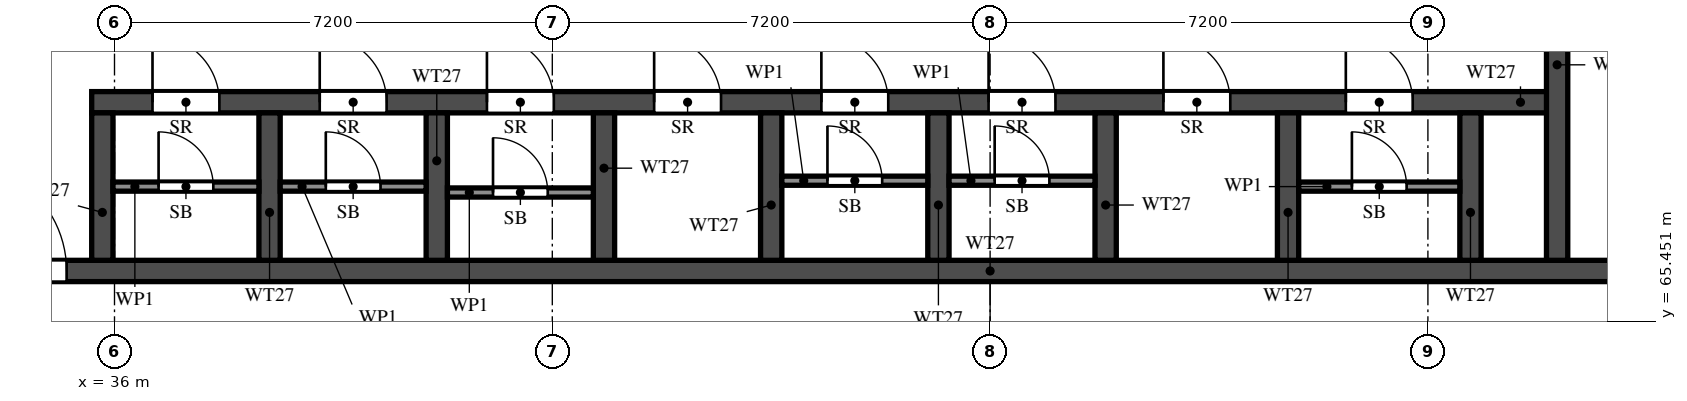
"""IFC4 building model, lengths in metres.
Left out: names, types, materials, properties, quantities, classifications, styles, units other than length and angle.
Written with IfcOpenShell. Run it as: python <this file> out.ifc"""

import sys

from ifc_helpers import new_model, si_unit, direction, frame, frame_2d, origin, place, context, subcontext, project, spatial, rectangle, extrude, element, fill, save


model = new_model("IFC4")
c1 = context("Model", 3, precision=1e-05, world=origin(), true_north=direction((0.0, 1.0)))
c2 = subcontext(c1, "Body", "Model", "MODEL_VIEW")
j1 = project(units=[si_unit("LENGTHUNIT", "METRE"), si_unit("PLANEANGLEUNIT", "RADIAN")], contexts=[c1])
p1 = place(None, origin())
s1 = spatial("IfcSite", under=j1, at=p1, CompositionType="ELEMENT")
p2 = place(p1, origin())
s2 = spatial("IfcBuilding", under=s1, at=p2, CompositionType="ELEMENT")
p3 = place(p2, frame((0.0, 0.0, 199.0)))
s3 = spatial("IfcBuildingStorey", under=s2, at=p3, CompositionType="ELEMENT", Elevation=199.0)
p4 = place(p3, frame((29.7, 66.275, 0.0), z_axis=(0.0, 0.0, 1.0), x_axis=(1.0, 0.0, 0.0)))
e1 = element("IfcWall", 1, at=p4, inside=s3, PredefinedType="SHEAR", context=c2, shape_type="SweptSolid", body=[
    extrude(rectangle(XDim=41.4, YDim=0.35, at=frame_2d((20.7, 0.0))), origin(), (0.0, 0.0, 1.0), 3.2),
])
p5 = place(p4, frame((0.925, 0.0, 0.0)))
e2 = element("IfcOpeningElement", 2, at=p5, cuts=e1, PredefinedType="OPENING", context=c2, shape_type="SweptSolid", body=[
    extrude(rectangle(XDim=1.1, YDim=2.1, at=frame_2d((0.55, 1.05))), frame((0.0, 0.185, 0.0), z_axis=(0.0, -1.0, 0.0), x_axis=(1.0, 0.0, 0.0)), (0.0, 0.0, 1.0), 0.37),
])
p6 = place(p4, frame((3.712, 0.0, 0.0)))
e3 = element("IfcOpeningElement", 3, at=p6, cuts=e1, PredefinedType="OPENING", context=c2, shape_type="SweptSolid", body=[
    extrude(rectangle(XDim=1.8, YDim=2.1, at=frame_2d((0.9, 1.05))), frame((0.0, 0.185, 0.0), z_axis=(0.0, -1.0, 0.0), x_axis=(1.0, 0.0, 0.0)), (0.0, 0.0, 1.0), 0.37),
])
p7 = place(p3, frame((35.625, 69.05, 0.0), z_axis=(0.0, 0.0, 1.0), x_axis=(1.0, 0.0, 0.0)))
e4 = element("IfcWall", 4, at=p7, inside=s3, PredefinedType="SHEAR", context=c2, shape_type="SweptSolid", body=[
    extrude(rectangle(XDim=24.1, YDim=0.35, at=frame_2d((12.05, 0.0))), origin(), (0.0, 0.0, 1.0), 3.2),
])
p8 = place(p7, frame((1.0, 0.0, 0.0)))
e5 = element("IfcOpeningElement", 5, at=p8, cuts=e4, PredefinedType="OPENING", context=c2, shape_type="SweptSolid", body=[
    extrude(rectangle(XDim=1.1, YDim=2.1, at=frame_2d((0.55, 1.05))), frame((0.0, 0.185, 0.0), z_axis=(0.0, -1.0, 0.0), x_axis=(1.0, 0.0, 0.0)), (0.0, 0.0, 1.0), 0.37),
])
p9 = place(p7, frame((3.75, 0.0, 0.0)))
e6 = element("IfcOpeningElement", 6, at=p9, cuts=e4, PredefinedType="OPENING", context=c2, shape_type="SweptSolid", body=[
    extrude(rectangle(XDim=1.1, YDim=2.1, at=frame_2d((0.55, 1.05))), frame((0.0, 0.185, 0.0), z_axis=(0.0, -1.0, 0.0), x_axis=(1.0, 0.0, 0.0)), (0.0, 0.0, 1.0), 0.37),
])
p10 = place(p7, frame((6.5, 0.0, 0.0)))
e7 = element("IfcOpeningElement", 7, at=p10, cuts=e4, PredefinedType="OPENING", context=c2, shape_type="SweptSolid", body=[
    extrude(rectangle(XDim=1.1, YDim=2.1, at=frame_2d((0.55, 1.05))), frame((0.0, 0.185, 0.0), z_axis=(0.0, -1.0, 0.0), x_axis=(1.0, 0.0, 0.0)), (0.0, 0.0, 1.0), 0.37),
])
p11 = place(p7, frame((9.25, 0.0, 0.0)))
e8 = element("IfcOpeningElement", 8, at=p11, cuts=e4, PredefinedType="OPENING", context=c2, shape_type="SweptSolid", body=[
    extrude(rectangle(XDim=1.1, YDim=2.1, at=frame_2d((0.55, 1.05))), frame((0.0, 0.185, 0.0), z_axis=(0.0, -1.0, 0.0), x_axis=(1.0, 0.0, 0.0)), (0.0, 0.0, 1.0), 0.37),
])
p12 = place(p7, frame((12.0, 0.0, 0.0)))
e9 = element("IfcOpeningElement", 9, at=p12, cuts=e4, PredefinedType="OPENING", context=c2, shape_type="SweptSolid", body=[
    extrude(rectangle(XDim=1.1, YDim=2.1, at=frame_2d((0.55, 1.05))), frame((0.0, 0.185, 0.0), z_axis=(0.0, -1.0, 0.0), x_axis=(1.0, 0.0, 0.0)), (0.0, 0.0, 1.0), 0.37),
])
p13 = place(p7, frame((14.75, 0.0, 0.0)))
e10 = element("IfcOpeningElement", 10, at=p13, cuts=e4, PredefinedType="OPENING", context=c2, shape_type="SweptSolid", body=[
    extrude(rectangle(XDim=1.1, YDim=2.1, at=frame_2d((0.55, 1.05))), frame((0.0, 0.185, 0.0), z_axis=(0.0, -1.0, 0.0), x_axis=(1.0, 0.0, 0.0)), (0.0, 0.0, 1.0), 0.37),
])
p14 = place(p7, frame((17.625, 0.0, 0.0)))
e11 = element("IfcOpeningElement", 11, at=p14, cuts=e4, PredefinedType="OPENING", context=c2, shape_type="SweptSolid", body=[
    extrude(rectangle(XDim=1.1, YDim=2.1, at=frame_2d((0.55, 1.05))), frame((0.0, 0.185, 0.0), z_axis=(0.0, -1.0, 0.0), x_axis=(1.0, 0.0, 0.0)), (0.0, 0.0, 1.0), 0.37),
])
p15 = place(p7, frame((20.625, 0.0, 0.0)))
e12 = element("IfcOpeningElement", 12, at=p15, cuts=e4, PredefinedType="OPENING", context=c2, shape_type="SweptSolid", body=[
    extrude(rectangle(XDim=1.1, YDim=2.1, at=frame_2d((0.55, 1.05))), frame((0.0, 0.185, 0.0), z_axis=(0.0, -1.0, 0.0), x_axis=(1.0, 0.0, 0.0)), (0.0, 0.0, 1.0), 0.37),
])
p16 = place(p3, frame((59.725, 66.45, 0.0), z_axis=(0.0, 0.0, 1.0), x_axis=(0.0, 1.0, 0.0)))
e13 = element("IfcWall", 13, at=p16, inside=s3, PredefinedType="SHEAR", context=c2, shape_type="SweptSolid", body=[
    extrude(rectangle(XDim=6.125, YDim=0.35, at=frame_2d((3.062, 0.0))), origin(), (0.0, 0.0, 1.0), 3.2),
])
p17 = place(p16, frame((3.85, 0.0, 0.0)))
e14 = element("IfcOpeningElement", 14, at=p17, cuts=e13, PredefinedType="OPENING", context=c2, shape_type="SweptSolid", body=[
    extrude(rectangle(XDim=1.2, YDim=2.1, at=frame_2d((0.6, 1.05))), frame((0.0, 0.185, 0.0), z_axis=(0.0, -1.0, 0.0), x_axis=(1.0, 0.0, 0.0)), (0.0, 0.0, 1.0), 0.37),
])
for number, where, z_axis, x_axis in (
    (15, (35.8, 66.45, 0.0), (0.0, 0.0, 1.0), (0.0, 1.0, 0.0)),
    (16, (38.55, 66.45, 0.0), (0.0, 0.0, 1.0), (0.0, 1.0, 0.0)),
    (17, (41.3, 66.45, 0.0), (0.0, 0.0, 1.0), (0.0, 1.0, 0.0)),
    (18, (44.05, 66.45, 0.0), (0.0, 0.0, 1.0), (0.0, 1.0, 0.0)),
    (19, (46.8, 66.45, 0.0), (0.0, 0.0, 1.0), (0.0, 1.0, 0.0)),
    (20, (49.55, 66.45, 0.0), (0.0, 0.0, 1.0), (0.0, 1.0, 0.0)),
    (21, (52.3, 66.45, 0.0), (0.0, 0.0, 1.0), (0.0, 1.0, 0.0)),
    (22, (55.3, 66.45, 0.0), (0.0, 0.0, 1.0), (0.0, 1.0, 0.0)),
    (23, (58.3, 66.45, 0.0), (0.0, 0.0, 1.0), (0.0, 1.0, 0.0)),
):
    element("IfcWall", number, at=place(p3, frame(where, z_axis=z_axis, x_axis=x_axis)), inside=s3, PredefinedType="SHEAR", context=c2, shape_type="SweptSolid", body=[
        extrude(rectangle(XDim=2.425, YDim=0.35, at=frame_2d((1.212, 0.0))), origin(), (0.0, 0.0, 1.0), 3.2),
    ])
p18 = place(p3, frame((35.975, 67.663, 0.0), z_axis=(0.0, 0.0, 1.0), x_axis=(1.0, 0.0, 0.0)))
e24 = element("IfcWall", 24, at=p18, inside=s3, PredefinedType="PARTITIONING", context=c2, shape_type="SweptSolid", body=[
    extrude(rectangle(XDim=2.4, YDim=0.15, at=frame_2d((1.2, 0.0))), origin(), (0.0, 0.0, 1.0), 3.2),
])
p19 = place(p18, frame((0.75, 0.0, 0.0)))
e25 = element("IfcOpeningElement", 25, at=p19, cuts=e24, PredefinedType="OPENING", context=c2, shape_type="SweptSolid", body=[
    extrude(rectangle(XDim=0.9, YDim=2.1, at=frame_2d((0.45, 1.05))), frame((0.0, 0.085, 0.0), z_axis=(0.0, -1.0, 0.0), x_axis=(1.0, 0.0, 0.0)), (0.0, 0.0, 1.0), 0.17),
])
p20 = place(p3, frame((38.725, 67.663, 0.0), z_axis=(0.0, 0.0, 1.0), x_axis=(1.0, 0.0, 0.0)))
e26 = element("IfcWall", 26, at=p20, inside=s3, PredefinedType="PARTITIONING", context=c2, shape_type="SweptSolid", body=[
    extrude(rectangle(XDim=2.4, YDim=0.15, at=frame_2d((1.2, 0.0))), origin(), (0.0, 0.0, 1.0), 3.2),
])
p21 = place(p20, frame((0.75, 0.0, 0.0)))
e27 = element("IfcOpeningElement", 27, at=p21, cuts=e26, PredefinedType="OPENING", context=c2, shape_type="SweptSolid", body=[
    extrude(rectangle(XDim=0.9, YDim=2.1, at=frame_2d((0.45, 1.05))), frame((0.0, 0.085, 0.0), z_axis=(0.0, -1.0, 0.0), x_axis=(1.0, 0.0, 0.0)), (0.0, 0.0, 1.0), 0.17),
])
p22 = place(p3, frame((41.475, 67.565, 0.0), z_axis=(0.0, 0.0, 1.0), x_axis=(1.0, 0.0, 0.0)))
e28 = element("IfcWall", 28, at=p22, inside=s3, PredefinedType="PARTITIONING", context=c2, shape_type="SweptSolid", body=[
    extrude(rectangle(XDim=2.4, YDim=0.15, at=frame_2d((1.2, 0.0))), origin(), (0.0, 0.0, 1.0), 3.2),
])
p23 = place(p22, frame((0.75, 0.0, 0.0)))
e29 = element("IfcOpeningElement", 29, at=p23, cuts=e28, PredefinedType="OPENING", context=c2, shape_type="SweptSolid", body=[
    extrude(rectangle(XDim=0.9, YDim=2.1, at=frame_2d((0.45, 1.05))), frame((0.0, 0.085, 0.0), z_axis=(0.0, -1.0, 0.0), x_axis=(1.0, 0.0, 0.0)), (0.0, 0.0, 1.0), 0.17),
])
p24 = place(p3, frame((46.975, 67.76, 0.0), z_axis=(0.0, 0.0, 1.0), x_axis=(1.0, 0.0, 0.0)))
e30 = element("IfcWall", 30, at=p24, inside=s3, PredefinedType="PARTITIONING", context=c2, shape_type="SweptSolid", body=[
    extrude(rectangle(XDim=2.4, YDim=0.15, at=frame_2d((1.2, 0.0))), origin(), (0.0, 0.0, 1.0), 3.2),
])
p25 = place(p24, frame((0.75, 0.0, 0.0)))
e31 = element("IfcOpeningElement", 31, at=p25, cuts=e30, PredefinedType="OPENING", context=c2, shape_type="SweptSolid", body=[
    extrude(rectangle(XDim=0.9, YDim=2.1, at=frame_2d((0.45, 1.05))), frame((0.0, 0.085, 0.0), z_axis=(0.0, -1.0, 0.0), x_axis=(1.0, 0.0, 0.0)), (0.0, 0.0, 1.0), 0.17),
])
p26 = place(p3, frame((49.725, 67.76, 0.0), z_axis=(0.0, 0.0, 1.0), x_axis=(1.0, 0.0, 0.0)))
e32 = element("IfcWall", 32, at=p26, inside=s3, PredefinedType="PARTITIONING", context=c2, shape_type="SweptSolid", body=[
    extrude(rectangle(XDim=2.4, YDim=0.15, at=frame_2d((1.2, 0.0))), origin(), (0.0, 0.0, 1.0), 3.2),
])
p27 = place(p26, frame((0.75, 0.0, 0.0)))
e33 = element("IfcOpeningElement", 33, at=p27, cuts=e32, PredefinedType="OPENING", context=c2, shape_type="SweptSolid", body=[
    extrude(rectangle(XDim=0.9, YDim=2.1, at=frame_2d((0.45, 1.05))), frame((0.0, 0.085, 0.0), z_axis=(0.0, -1.0, 0.0), x_axis=(1.0, 0.0, 0.0)), (0.0, 0.0, 1.0), 0.17),
])
p28 = place(p3, frame((55.475, 67.663, 0.0), z_axis=(0.0, 0.0, 1.0), x_axis=(1.0, 0.0, 0.0)))
e34 = element("IfcWall", 34, at=p28, inside=s3, PredefinedType="PARTITIONING", context=c2, shape_type="SweptSolid", body=[
    extrude(rectangle(XDim=2.65, YDim=0.15, at=frame_2d((1.325, 0.0))), origin(), (0.0, 0.0, 1.0), 3.2),
])
p29 = place(p28, frame((0.875, 0.0, 0.0)))
e35 = element("IfcOpeningElement", 35, at=p29, cuts=e34, PredefinedType="OPENING", context=c2, shape_type="SweptSolid", body=[
    extrude(rectangle(XDim=0.9, YDim=2.1, at=frame_2d((0.45, 1.05))), frame((0.0, 0.085, 0.0), z_axis=(0.0, -1.0, 0.0), x_axis=(1.0, 0.0, 0.0)), (0.0, 0.0, 1.0), 0.17),
])
p30 = place(p6, origin())
e36 = element("IfcDoor", 36, at=p30, inside=s3, OperationType="DOUBLE_DOOR_SINGLE_SWING", PredefinedType="DOOR", context=c2, shape_type="SweptSolid", body=[
    extrude(rectangle(XDim=1.8, YDim=2.1, at=frame_2d((0.9, 1.05))), frame((0.0, 0.025, 0.0), z_axis=(0.0, -1.0, 0.0), x_axis=(1.0, 0.0, 0.0)), (0.0, 0.0, 1.0), 0.05),
])
fill(e3, e36)
p31 = place(p8, origin())
e37 = element("IfcDoor", 37, at=p31, inside=s3, OperationType="SINGLE_SWING_RIGHT", PredefinedType="DOOR", context=c2, shape_type="SweptSolid", body=[
    extrude(rectangle(XDim=1.1, YDim=2.1, at=frame_2d((0.55, 1.05))), frame((0.0, 0.025, 0.0), z_axis=(0.0, -1.0, 0.0), x_axis=(1.0, 0.0, 0.0)), (0.0, 0.0, 1.0), 0.05),
])
fill(e5, e37)
p32 = place(p19, origin())
e38 = element("IfcDoor", 38, at=p32, inside=s3, OperationType="SINGLE_SWING_RIGHT", PredefinedType="DOOR", context=c2, shape_type="SweptSolid", body=[
    extrude(rectangle(XDim=0.9, YDim=2.1, at=frame_2d((0.45, 1.05))), frame((0.0, 0.025, 0.0), z_axis=(0.0, -1.0, 0.0), x_axis=(1.0, 0.0, 0.0)), (0.0, 0.0, 1.0), 0.05),
])
fill(e25, e38)
p33 = place(p9, origin())
e39 = element("IfcDoor", 39, at=p33, inside=s3, OperationType="SINGLE_SWING_LEFT", PredefinedType="DOOR", context=c2, shape_type="SweptSolid", body=[
    extrude(rectangle(XDim=1.1, YDim=2.1, at=frame_2d((0.55, 1.05))), frame((0.0, 0.025, 0.0), z_axis=(0.0, -1.0, 0.0), x_axis=(1.0, 0.0, 0.0)), (0.0, 0.0, 1.0), 0.05),
])
fill(e6, e39)
p34 = place(p21, origin())
e40 = element("IfcDoor", 40, at=p34, inside=s3, OperationType="SINGLE_SWING_LEFT", PredefinedType="DOOR", context=c2, shape_type="SweptSolid", body=[
    extrude(rectangle(XDim=0.9, YDim=2.1, at=frame_2d((0.45, 1.05))), frame((0.0, 0.025, 0.0), z_axis=(0.0, -1.0, 0.0), x_axis=(1.0, 0.0, 0.0)), (0.0, 0.0, 1.0), 0.05),
])
fill(e27, e40)
p35 = place(p10, origin())
e41 = element("IfcDoor", 41, at=p35, inside=s3, OperationType="SINGLE_SWING_RIGHT", PredefinedType="DOOR", context=c2, shape_type="SweptSolid", body=[
    extrude(rectangle(XDim=1.1, YDim=2.1, at=frame_2d((0.55, 1.05))), frame((0.0, 0.025, 0.0), z_axis=(0.0, -1.0, 0.0), x_axis=(1.0, 0.0, 0.0)), (0.0, 0.0, 1.0), 0.05),
])
fill(e7, e41)
p36 = place(p23, origin())
e42 = element("IfcDoor", 42, at=p36, inside=s3, OperationType="SINGLE_SWING_RIGHT", PredefinedType="DOOR", context=c2, shape_type="SweptSolid", body=[
    extrude(rectangle(XDim=0.9, YDim=2.1, at=frame_2d((0.45, 1.05))), frame((0.0, 0.025, 0.0), z_axis=(0.0, -1.0, 0.0), x_axis=(1.0, 0.0, 0.0)), (0.0, 0.0, 1.0), 0.05),
])
fill(e29, e42)
p37 = place(p11, origin())
e43 = element("IfcDoor", 43, at=p37, inside=s3, OperationType="SINGLE_SWING_LEFT", PredefinedType="DOOR", context=c2, shape_type="SweptSolid", body=[
    extrude(rectangle(XDim=1.1, YDim=2.1, at=frame_2d((0.55, 1.05))), frame((0.0, 0.025, 0.0), z_axis=(0.0, -1.0, 0.0), x_axis=(1.0, 0.0, 0.0)), (0.0, 0.0, 1.0), 0.05),
])
fill(e8, e43)
p38 = place(p12, origin())
e44 = element("IfcDoor", 44, at=p38, inside=s3, OperationType="SINGLE_SWING_RIGHT", PredefinedType="DOOR", context=c2, shape_type="SweptSolid", body=[
    extrude(rectangle(XDim=1.1, YDim=2.1, at=frame_2d((0.55, 1.05))), frame((0.0, 0.025, 0.0), z_axis=(0.0, -1.0, 0.0), x_axis=(1.0, 0.0, 0.0)), (0.0, 0.0, 1.0), 0.05),
])
fill(e9, e44)
p39 = place(p25, origin())
e45 = element("IfcDoor", 45, at=p39, inside=s3, OperationType="SINGLE_SWING_LEFT", PredefinedType="DOOR", context=c2, shape_type="SweptSolid", body=[
    extrude(rectangle(XDim=0.9, YDim=2.1, at=frame_2d((0.45, 1.05))), frame((0.0, 0.025, 0.0), z_axis=(0.0, -1.0, 0.0), x_axis=(1.0, 0.0, 0.0)), (0.0, 0.0, 1.0), 0.05),
])
fill(e31, e45)
p40 = place(p13, origin())
e46 = element("IfcDoor", 46, at=p40, inside=s3, OperationType="SINGLE_SWING_LEFT", PredefinedType="DOOR", context=c2, shape_type="SweptSolid", body=[
    extrude(rectangle(XDim=1.1, YDim=2.1, at=frame_2d((0.55, 1.05))), frame((0.0, 0.025, 0.0), z_axis=(0.0, -1.0, 0.0), x_axis=(1.0, 0.0, 0.0)), (0.0, 0.0, 1.0), 0.05),
])
fill(e10, e46)
p41 = place(p27, origin())
e47 = element("IfcDoor", 47, at=p41, inside=s3, OperationType="SINGLE_SWING_RIGHT", PredefinedType="DOOR", context=c2, shape_type="SweptSolid", body=[
    extrude(rectangle(XDim=0.9, YDim=2.1, at=frame_2d((0.45, 1.05))), frame((0.0, 0.025, 0.0), z_axis=(0.0, -1.0, 0.0), x_axis=(1.0, 0.0, 0.0)), (0.0, 0.0, 1.0), 0.05),
])
fill(e33, e47)
p42 = place(p14, origin())
e48 = element("IfcDoor", 48, at=p42, inside=s3, OperationType="SINGLE_SWING_RIGHT", PredefinedType="DOOR", context=c2, shape_type="SweptSolid", body=[
    extrude(rectangle(XDim=1.1, YDim=2.1, at=frame_2d((0.55, 1.05))), frame((0.0, 0.025, 0.0), z_axis=(0.0, -1.0, 0.0), x_axis=(1.0, 0.0, 0.0)), (0.0, 0.0, 1.0), 0.05),
])
fill(e11, e48)
p43 = place(p15, origin())
e49 = element("IfcDoor", 49, at=p43, inside=s3, OperationType="SINGLE_SWING_RIGHT", PredefinedType="DOOR", context=c2, shape_type="SweptSolid", body=[
    extrude(rectangle(XDim=1.1, YDim=2.1, at=frame_2d((0.55, 1.05))), frame((0.0, 0.025, 0.0), z_axis=(0.0, -1.0, 0.0), x_axis=(1.0, 0.0, 0.0)), (0.0, 0.0, 1.0), 0.05),
])
fill(e12, e49)
p44 = place(p29, origin())
e50 = element("IfcDoor", 50, at=p44, inside=s3, OperationType="SINGLE_SWING_LEFT", PredefinedType="DOOR", context=c2, shape_type="SweptSolid", body=[
    extrude(rectangle(XDim=0.9, YDim=2.1, at=frame_2d((0.45, 1.05))), frame((0.0, 0.025, 0.0), z_axis=(0.0, -1.0, 0.0), x_axis=(1.0, 0.0, 0.0)), (0.0, 0.0, 1.0), 0.05),
])
fill(e35, e50)
save(model, sys.argv[1])
